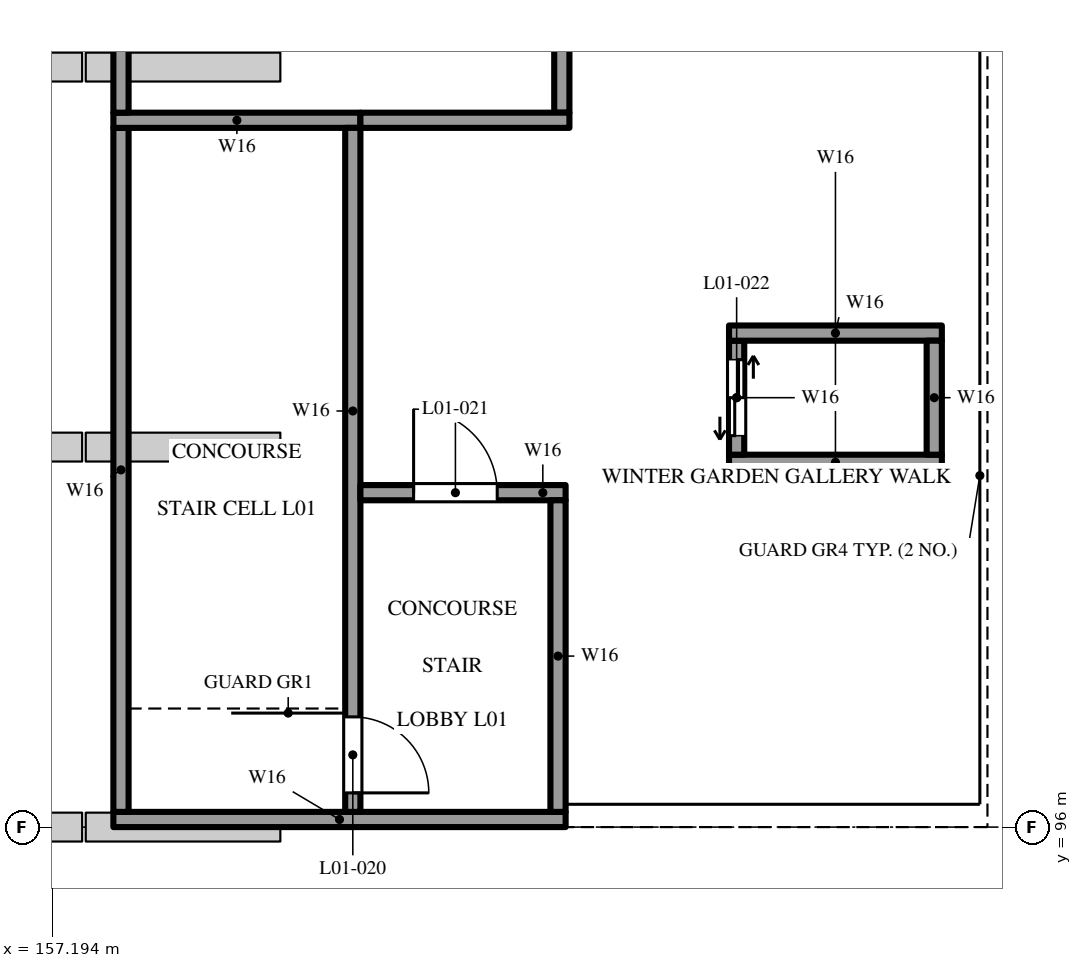
"""IFC4 building model, lengths in metres.
Left out: names, types, materials, properties, quantities, classifications, styles, units other than length and angle.
Written with IfcOpenShell. Run it as: python <this file> out.ifc"""

import sys

from ifc_helpers import new_model, si_unit, direction, frame, frame_2d, origin, place, context, subcontext, project, spatial, rectangle, extrude, element, fill, save


model = new_model("IFC4")
c1 = context("Model", 3, precision=1e-05, world=origin(), true_north=direction((0.0, 1.0)))
c2 = subcontext(c1, "Body", "Model", "MODEL_VIEW")
j1 = project(units=[si_unit("LENGTHUNIT", "METRE"), si_unit("PLANEANGLEUNIT", "RADIAN")], contexts=[c1])
p1 = place(None, origin())
s1 = spatial("IfcSite", under=j1, at=p1, CompositionType="ELEMENT")
p2 = place(p1, origin())
s2 = spatial("IfcBuilding", under=s1, at=p2, CompositionType="ELEMENT")
p3 = place(p2, frame((0.0, 0.0, 7.2)))
s3 = spatial("IfcBuildingStorey", under=s2, at=p3, CompositionType="ELEMENT", Elevation=7.2)
p4 = place(p3, frame((158.0, 96.1, 0.0), z_axis=(0.0, 0.0, 1.0), x_axis=(1.0, 0.0, 0.0)))
e1 = element("IfcWall", 1, at=p4, inside=s3, PredefinedType="SOLIDWALL", context=c2, shape_type="SweptSolid", body=[
    extrude(rectangle(XDim=5.95, YDim=0.2, at=frame_2d((2.975, 0.0))), origin(), (0.0, 0.0, 1.0), 3.4),
])
p5 = place(p3, frame((158.1, 96.2, 0.0), z_axis=(0.0, 0.0, 1.0), x_axis=(0.0, 1.0, 0.0)))
e2 = element("IfcWall", 2, at=p5, inside=s3, PredefinedType="SOLIDWALL", context=c2, shape_type="SweptSolid", body=[
    extrude(rectangle(XDim=9.0, YDim=0.2, at=frame_2d((4.5, 0.0))), origin(), (0.0, 0.0, 1.0), 3.4),
])
p6 = place(p3, frame((158.0, 105.3, 0.0), z_axis=(0.0, 0.0, 1.0), x_axis=(1.0, 0.0, 0.0)))
e3 = element("IfcWall", 3, at=p6, inside=s3, PredefinedType="SOLIDWALL", context=c2, shape_type="SweptSolid", body=[
    extrude(rectangle(XDim=3.25, YDim=0.2, at=frame_2d((1.625, 0.0))), origin(), (0.0, 0.0, 1.0), 3.4),
])
p7 = place(p3, frame((161.15, 96.2, 0.0), z_axis=(0.0, 0.0, 1.0), x_axis=(0.0, 1.0, 0.0)))
e4 = element("IfcWall", 4, at=p7, inside=s3, PredefinedType="SOLIDWALL", context=c2, shape_type="SweptSolid", body=[
    extrude(rectangle(XDim=9.0, YDim=0.2, at=frame_2d((4.5, 0.0))), origin(), (0.0, 0.0, 1.0), 3.4),
])
p8 = place(p7, frame((0.25, 0.0, 0.0)))
e5 = element("IfcOpeningElement", 5, at=p8, cuts=e4, PredefinedType="OPENING", context=c2, shape_type="SweptSolid", body=[
    extrude(rectangle(XDim=1.0, YDim=2.1, at=frame_2d((0.5, 1.05))), frame((0.0, 0.11, 0.0), z_axis=(0.0, -1.0, 0.0), x_axis=(1.0, 0.0, 0.0)), (0.0, 0.0, 1.0), 0.22),
])
p9 = place(p3, frame((161.25, 100.4, 0.0), z_axis=(0.0, 0.0, 1.0), x_axis=(1.0, 0.0, 0.0)))
e6 = element("IfcWall", 6, at=p9, inside=s3, PredefinedType="SOLIDWALL", context=c2, shape_type="SweptSolid", body=[
    extrude(rectangle(XDim=2.7, YDim=0.2, at=frame_2d((1.35, 0.0))), origin(), (0.0, 0.0, 1.0), 3.4),
])
p10 = place(p9, frame((0.7, 0.0, 0.0)))
e7 = element("IfcOpeningElement", 7, at=p10, cuts=e6, PredefinedType="OPENING", context=c2, shape_type="SweptSolid", body=[
    extrude(rectangle(XDim=1.1, YDim=2.1, at=frame_2d((0.55, 1.05))), frame((0.0, 0.11, 0.0), z_axis=(0.0, -1.0, 0.0), x_axis=(1.0, 0.0, 0.0)), (0.0, 0.0, 1.0), 0.22),
])
p11 = place(p3, frame((163.85, 96.2, 0.0), z_axis=(0.0, 0.0, 1.0), x_axis=(0.0, 1.0, 0.0)))
e8 = element("IfcWall", 8, at=p11, inside=s3, PredefinedType="SOLIDWALL", context=c2, shape_type="SweptSolid", body=[
    extrude(rectangle(XDim=4.1, YDim=0.2, at=frame_2d((2.05, 0.0))), origin(), (0.0, 0.0, 1.0), 3.4),
])
p12 = place(p3, frame((166.1, 100.8, 0.0), z_axis=(0.0, 0.0, 1.0), x_axis=(1.0, 0.0, 0.0)))
e9 = element("IfcWall", 9, at=p12, inside=s3, PredefinedType="SOLIDWALL", context=c2, shape_type="SweptSolid", body=[
    extrude(rectangle(XDim=2.8, YDim=0.2, at=frame_2d((1.4, 0.0))), origin(), (0.0, 0.0, 1.0), 3.6),
])
p13 = place(p3, frame((166.2, 100.9, 0.0), z_axis=(0.0, 0.0, 1.0), x_axis=(0.0, 1.0, 0.0)))
e10 = element("IfcWall", 10, at=p13, inside=s3, PredefinedType="SOLIDWALL", context=c2, shape_type="SweptSolid", body=[
    extrude(rectangle(XDim=1.5, YDim=0.2, at=frame_2d((0.75, 0.0))), origin(), (0.0, 0.0, 1.0), 3.6),
])
p14 = place(p13, frame((0.25, 0.0, 0.0)))
e11 = element("IfcOpeningElement", 11, at=p14, cuts=e10, PredefinedType="OPENING", context=c2, shape_type="SweptSolid", body=[
    extrude(rectangle(XDim=1.0, YDim=2.1, at=frame_2d((0.5, 1.05))), frame((0.0, 0.11, 0.0), z_axis=(0.0, -1.0, 0.0), x_axis=(1.0, 0.0, 0.0)), (0.0, 0.0, 1.0), 0.22),
])
p15 = place(p3, frame((166.1, 102.5, 0.0), z_axis=(0.0, 0.0, 1.0), x_axis=(1.0, 0.0, 0.0)))
e12 = element("IfcWall", 12, at=p15, inside=s3, PredefinedType="SOLIDWALL", context=c2, shape_type="SweptSolid", body=[
    extrude(rectangle(XDim=2.8, YDim=0.2, at=frame_2d((1.4, 0.0))), origin(), (0.0, 0.0, 1.0), 3.6),
])
p16 = place(p3, frame((168.8, 100.9, 0.0), z_axis=(0.0, 0.0, 1.0), x_axis=(0.0, 1.0, 0.0)))
e13 = element("IfcWall", 13, at=p16, inside=s3, PredefinedType="SOLIDWALL", context=c2, shape_type="SweptSolid", body=[
    extrude(rectangle(XDim=1.5, YDim=0.2, at=frame_2d((0.75, 0.0))), origin(), (0.0, 0.0, 1.0), 3.6),
])
p17 = place(p3, frame((158.1, 105.4, 0.0), z_axis=(0.0, 0.0, 1.0), x_axis=(0.0, 1.0, 0.0)))
e14 = element("IfcWall", 14, at=p17, inside=s3, PredefinedType="SOLIDWALL", context=c2, shape_type="SweptSolid", body=[
    extrude(rectangle(XDim=12.3, YDim=0.2, at=frame_2d((6.15, 0.0))), origin(), (0.0, 0.0, 1.0), 3.4),
])
p18 = place(p3, frame((163.9, 105.4, 0.0), z_axis=(0.0, 0.0, 1.0), x_axis=(0.0, 1.0, 0.0)))
e15 = element("IfcWall", 15, at=p18, inside=s3, PredefinedType="SOLIDWALL", context=c2, shape_type="SweptSolid", body=[
    extrude(rectangle(XDim=12.3, YDim=0.2, at=frame_2d((6.15, 0.0))), origin(), (0.0, 0.0, 1.0), 3.4),
])
p19 = place(p18, frame((5.5, 0.0, 0.0)))
e16 = element("IfcOpeningElement", 16, at=p19, cuts=e15, PredefinedType="OPENING", context=c2, shape_type="SweptSolid", body=[
    extrude(rectangle(XDim=1.6, YDim=2.4, at=frame_2d((0.8, 1.2))), frame((0.0, 0.11, 0.0), z_axis=(0.0, -1.0, 0.0), x_axis=(1.0, 0.0, 0.0)), (0.0, 0.0, 1.0), 0.22),
])
p20 = place(p18, frame((1.2, 0.0, 1.0)))
e17 = element("IfcOpeningElement", 17, at=p20, cuts=e15, PredefinedType="OPENING", context=c2, shape_type="SweptSolid", body=[
    extrude(rectangle(XDim=2.2, YDim=1.8, at=frame_2d((1.1, 0.9))), frame((0.0, 0.11, 0.0), z_axis=(0.0, -1.0, 0.0), x_axis=(1.0, 0.0, 0.0)), (0.0, 0.0, 1.0), 0.22),
])
p21 = place(p18, frame((9.0, 0.0, 1.0)))
e18 = element("IfcOpeningElement", 18, at=p21, cuts=e15, PredefinedType="OPENING", context=c2, shape_type="SweptSolid", body=[
    extrude(rectangle(XDim=2.2, YDim=1.8, at=frame_2d((1.1, 0.9))), frame((0.0, 0.11, 0.0), z_axis=(0.0, -1.0, 0.0), x_axis=(1.0, 0.0, 0.0)), (0.0, 0.0, 1.0), 0.22),
])
p22 = place(p3, frame((161.25, 105.3, 0.0), z_axis=(0.0, 0.0, 1.0), x_axis=(1.0, 0.0, 0.0)))
e19 = element("IfcWall", 19, at=p22, inside=s3, PredefinedType="SOLIDWALL", context=c2, shape_type="SweptSolid", body=[
    extrude(rectangle(XDim=2.75, YDim=0.2, at=frame_2d((1.375, 0.0))), origin(), (0.0, 0.0, 1.0), 3.4),
])
p23 = place(p8, frame((1.0, 0.0, 0.0), z_axis=(0.0, 0.0, 1.0), x_axis=(-1.0, 0.0, 0.0)))
e20 = element("IfcDoor", 20, at=p23, inside=s3, OperationType="SINGLE_SWING_RIGHT", PredefinedType="DOOR", context=c2, shape_type="SweptSolid", body=[
    extrude(rectangle(XDim=1.0, YDim=2.1, at=frame_2d((0.5, 1.05))), frame((0.0, 0.025, 0.0), z_axis=(0.0, -1.0, 0.0), x_axis=(1.0, 0.0, 0.0)), (0.0, 0.0, 1.0), 0.05),
])
fill(e5, e20)
p24 = place(p10, origin())
e21 = element("IfcDoor", 21, at=p24, inside=s3, OperationType="SINGLE_SWING_LEFT", PredefinedType="DOOR", context=c2, shape_type="SweptSolid", body=[
    extrude(rectangle(XDim=1.1, YDim=2.1, at=frame_2d((0.55, 1.05))), frame((0.0, 0.025, 0.0), z_axis=(0.0, -1.0, 0.0), x_axis=(1.0, 0.0, 0.0)), (0.0, 0.0, 1.0), 0.05),
])
fill(e7, e21)
p25 = place(p14, origin())
e22 = element("IfcDoor", 22, at=p25, inside=s3, OperationType="DOUBLE_DOOR_SLIDING", PredefinedType="DOOR", context=c2, shape_type="SweptSolid", body=[
    extrude(rectangle(XDim=1.0, YDim=2.1, at=frame_2d((0.5, 1.05))), frame((0.0, 0.025, 0.0), z_axis=(0.0, -1.0, 0.0), x_axis=(1.0, 0.0, 0.0)), (0.0, 0.0, 1.0), 0.05),
])
fill(e11, e22)
save(model, sys.argv[1])
